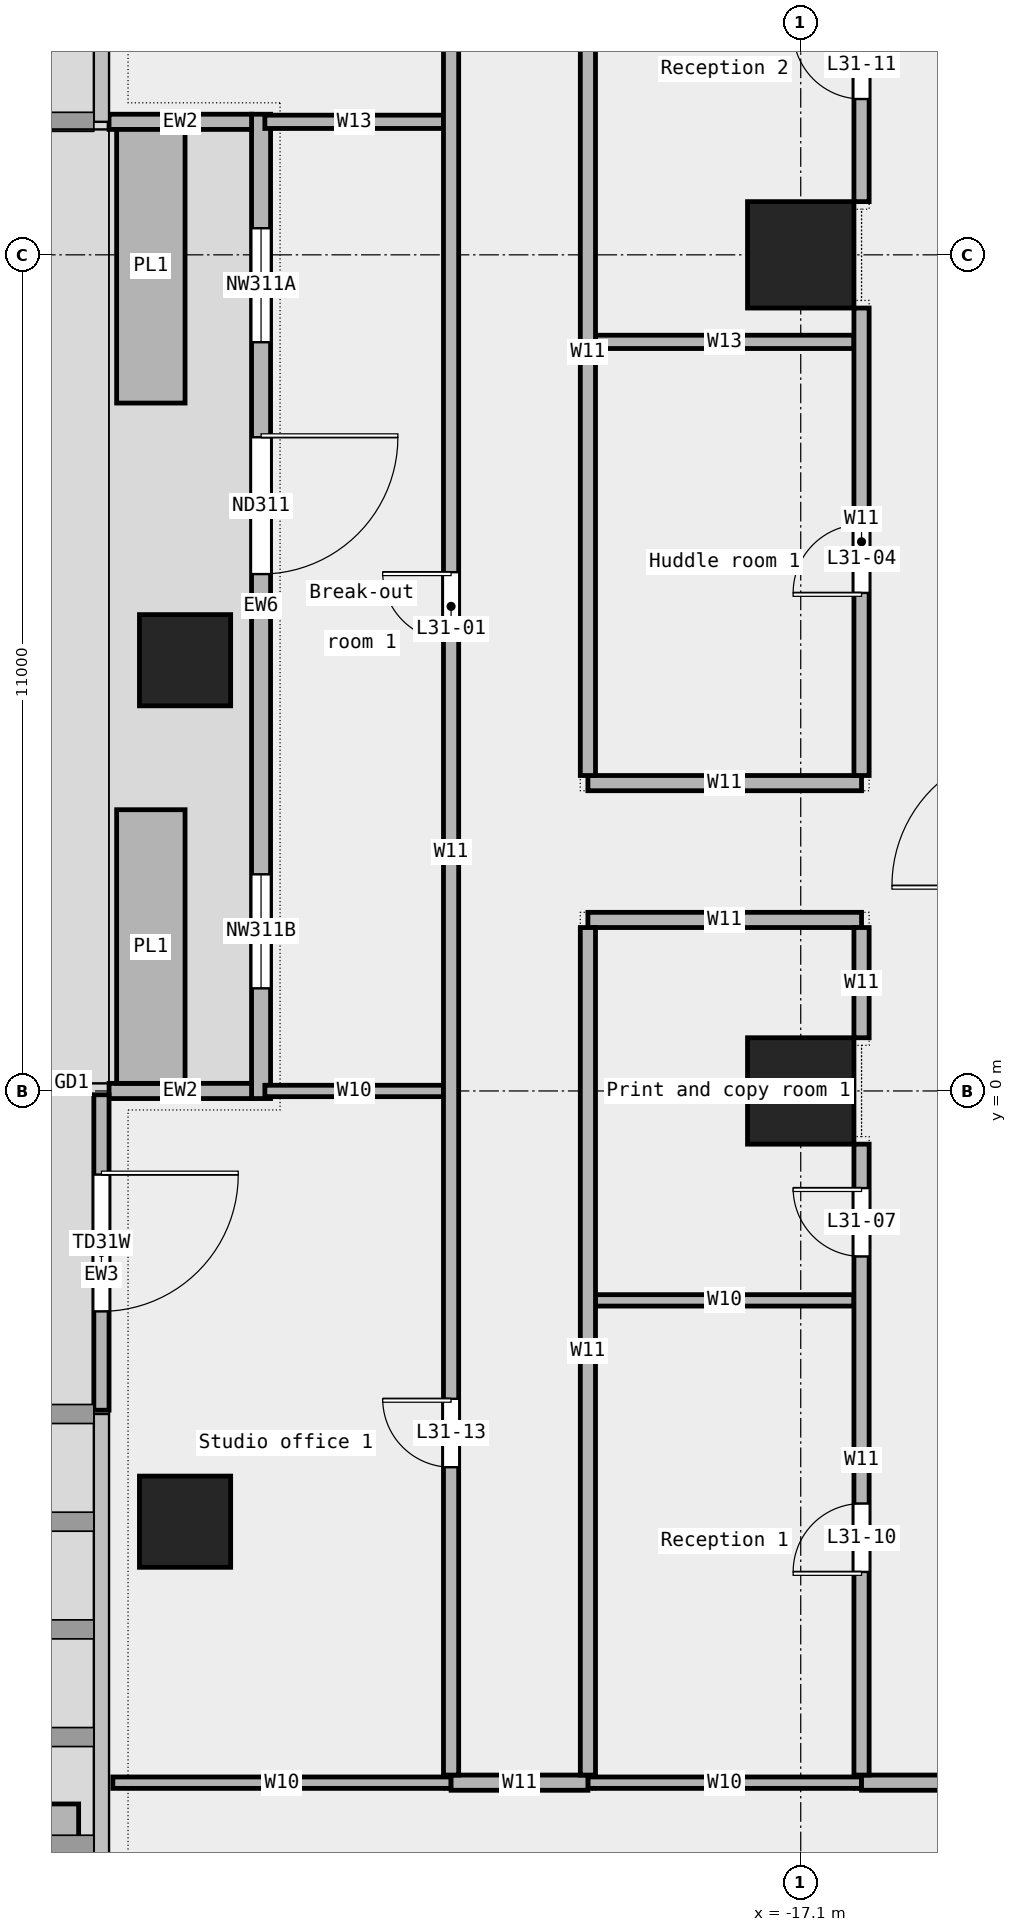
"""IFC4 building model, lengths in metres.
Left out: names, types, materials, properties, quantities, classifications, styles, units other than length and angle.
Written with IfcOpenShell. Run it as: python <this file> out.ifc"""

import sys

from ifc_helpers import new_model, si_unit, direction, frame, frame_2d, origin, origin_2d, place, context, subcontext, project, spatial, rectangle, extrude, element, fill, save


model = new_model("IFC4")
c1 = context("Model", 3, precision=1e-05, world=origin(), true_north=direction((0.0, 1.0)))
c2 = subcontext(c1, "Body", "Model", "MODEL_VIEW")
j1 = project(units=[si_unit("LENGTHUNIT", "METRE"), si_unit("PLANEANGLEUNIT", "RADIAN")], contexts=[c1])
p1 = place(None, origin())
s1 = spatial("IfcSite", under=j1, at=p1, CompositionType="ELEMENT")
p2 = place(p1, origin())
s2 = spatial("IfcBuilding", under=s1, at=p2, CompositionType="ELEMENT")
p3 = place(p2, frame((0.0, 0.0, 157.0)))
s3 = spatial("IfcBuildingStorey", under=s2, at=p3, CompositionType="ELEMENT", Elevation=157.0)
for number, where, z_axis, x_axis in (
    (1, (-25.2, 5.667, 0.0), (0.0, 0.0, 1.0), (1.0, 0.0, 0.0)),
    (2, (-25.2, -5.667, 0.0), (0.0, 0.0, 1.0), (1.0, 0.0, 0.0)),
):
    element("IfcColumn", number, at=place(p3, frame(where, z_axis=z_axis, x_axis=x_axis)), inside=s3, PredefinedType="COLUMN", context=c2, shape_type="SweptSolid", body=[
        extrude(rectangle(XDim=1.2, YDim=1.2, at=origin_2d()), origin(), (0.0, 0.0, 1.0), 3.6),
    ])
for number, where, z_axis, x_axis in (
    (3, (-17.1, 0.0, 0.0), (0.0, 0.0, 1.0), (1.0, 0.0, 0.0)),
    (4, (-17.1, 11.0, 0.0), (0.0, 0.0, 1.0), (1.0, 0.0, 0.0)),
):
    element("IfcColumn", number, at=place(p3, frame(where, z_axis=z_axis, x_axis=x_axis)), inside=s3, PredefinedType="COLUMN", context=c2, shape_type="SweptSolid", body=[
        extrude(rectangle(XDim=1.4, YDim=1.4, at=origin_2d()), origin(), (0.0, 0.0, 1.0), 3.6),
    ])
p4 = place(p3, frame((-24.2, 12.85, 0.0), z_axis=(0.0, 0.0, 1.0), x_axis=(0.0, -1.0, 0.0)))
e5 = element("IfcWall", 5, at=p4, inside=s3, PredefinedType="STANDARD", context=c2, shape_type="SweptSolid", body=[
    extrude(rectangle(XDim=12.95, YDim=0.25, at=frame_2d((6.475, 0.0))), origin(), (0.0, 0.0, 1.0), 3.6),
])
p5 = place(p4, frame((1.5, 0.0, 0.45)))
e6 = element("IfcOpeningElement", 6, at=p5, cuts=e5, PredefinedType="OPENING", context=c2, shape_type="SweptSolid", body=[
    extrude(rectangle(XDim=1.5, YDim=2.4, at=frame_2d((0.75, 1.2))), frame((0.0, 0.137, 0.0), z_axis=(0.0, -1.0, 0.0), x_axis=(1.0, 0.0, 0.0)), (0.0, 0.0, 1.0), 0.274),
])
p6 = place(p4, frame((4.25, 0.0, 0.0)))
e7 = element("IfcOpeningElement", 7, at=p6, cuts=e5, PredefinedType="OPENING", context=c2, shape_type="SweptSolid", body=[
    extrude(rectangle(XDim=1.8, YDim=2.4, at=frame_2d((0.9, 1.2))), frame((0.0, 0.137, 0.0), z_axis=(0.0, -1.0, 0.0), x_axis=(1.0, 0.0, 0.0)), (0.0, 0.0, 1.0), 0.274),
])
p7 = place(p4, frame((10.0, 0.0, 0.45)))
e8 = element("IfcOpeningElement", 8, at=p7, cuts=e5, PredefinedType="OPENING", context=c2, shape_type="SweptSolid", body=[
    extrude(rectangle(XDim=1.5, YDim=2.4, at=frame_2d((0.75, 1.2))), frame((0.0, 0.137, 0.0), z_axis=(0.0, -1.0, 0.0), x_axis=(1.0, 0.0, 0.0)), (0.0, 0.0, 1.0), 0.274),
])
for number, where, z_axis, x_axis in (
    (9, (-26.2, 12.75, 0.0), (0.0, 0.0, 1.0), (1.0, 0.0, 0.0)),
    (10, (-26.2, 0.0, 0.0), (0.0, 0.0, 1.0), (1.0, 0.0, 0.0)),
):
    element("IfcWall", number, at=place(p3, frame(where, z_axis=z_axis, x_axis=x_axis)), inside=s3, PredefinedType="STANDARD", context=c2, shape_type="SweptSolid", body=[
        extrude(rectangle(XDim=1.875, YDim=0.2, at=frame_2d((0.938, 0.0))), origin(), (0.0, 0.0, 1.0), 3.6),
    ])
for number, where, z_axis, x_axis in (
    (11, (-25.65, 12.65, 0.0), (0.0, 0.0, 1.0), (0.0, -1.0, 0.0)),
    (12, (-25.65, 3.7, 0.0), (0.0, 0.0, 1.0), (0.0, -1.0, 0.0)),
):
    element("IfcWall", number, at=place(p3, frame(where, z_axis=z_axis, x_axis=x_axis)), inside=s3, PredefinedType="STANDARD", context=c2, shape_type="SweptSolid", body=[
        extrude(rectangle(XDim=3.6, YDim=0.9, at=frame_2d((1.8, 0.0))), origin(), (0.0, 0.0, 1.0), 0.7),
    ])
p8 = place(p3, frame((-26.3, -0.05, 0.0), z_axis=(0.0, 0.0, 1.0), x_axis=(0.0, -1.0, 0.0)))
e13 = element("IfcWall", 13, at=p8, inside=s3, PredefinedType="STANDARD", context=c2, shape_type="SweptSolid", body=[
    extrude(rectangle(XDim=4.15, YDim=0.2, at=frame_2d((2.075, 0.0))), origin(), (0.0, 0.0, 1.0), 3.6),
])
p9 = place(p8, frame((1.05, 0.0, 0.0)))
e14 = element("IfcOpeningElement", 14, at=p9, cuts=e13, PredefinedType="OPENING", context=c2, shape_type="SweptSolid", body=[
    extrude(rectangle(XDim=1.8, YDim=2.4, at=frame_2d((0.9, 1.2))), frame((0.0, 0.112, 0.0), z_axis=(0.0, -1.0, 0.0), x_axis=(1.0, 0.0, 0.0)), (0.0, 0.0, 1.0), 0.224),
])
p10 = place(p3, frame((-26.9, -9.38, 0.0), z_axis=(0.0, 0.0, 1.0), x_axis=(0.0, -1.0, 0.0)))
e15 = element("IfcWall", 15, at=p10, inside=s3, PredefinedType="STANDARD", context=c2, shape_type="SweptSolid", body=[
    extrude(rectangle(XDim=3.0, YDim=0.6, at=frame_2d((1.5, 0.0))), origin(), (0.0, 0.0, 1.0), 0.7),
])
p11 = place(p3, frame((-26.15, -9.1, 0.0), z_axis=(0.0, 0.0, 1.0), x_axis=(1.0, 0.0, 0.0)))
e16 = element("IfcWall", 16, at=p11, inside=s3, PredefinedType="PARTITIONING", context=c2, shape_type="SweptSolid", body=[
    extrude(rectangle(XDim=4.45, YDim=0.15, at=frame_2d((2.225, 0.0))), origin(), (0.0, 0.0, 1.0), 3.6),
])
p12 = place(p3, frame((-19.9, -9.1, 0.0), z_axis=(0.0, 0.0, 1.0), x_axis=(1.0, 0.0, 0.0)))
e17 = element("IfcWall", 17, at=p12, inside=s3, PredefinedType="PARTITIONING", context=c2, shape_type="SweptSolid", body=[
    extrude(rectangle(XDim=3.6, YDim=0.15, at=frame_2d((1.8, 0.0))), origin(), (0.0, 0.0, 1.0), 3.6),
])
p13 = place(p3, frame((-21.7, -9.1, 0.0), z_axis=(0.0, 0.0, 1.0), x_axis=(1.0, 0.0, 0.0)))
e18 = element("IfcWall", 18, at=p13, inside=s3, PredefinedType="PARTITIONING", context=c2, shape_type="SweptSolid", body=[
    extrude(rectangle(XDim=1.8, YDim=0.2, at=frame_2d((0.9, 0.0))), origin(), (0.0, 0.0, 1.0), 3.6),
])
p14 = place(p3, frame((-16.3, -9.1, 0.0), z_axis=(0.0, 0.0, 1.0), x_axis=(1.0, 0.0, 0.0)))
e19 = element("IfcWall", 19, at=p14, inside=s3, PredefinedType="PARTITIONING", context=c2, shape_type="SweptSolid", body=[
    extrude(rectangle(XDim=5.02, YDim=0.2, at=frame_2d((2.51, 0.0))), origin(), (0.0, 0.0, 1.0), 3.6),
])
p15 = place(p3, frame((-19.8, -2.755, 0.0), z_axis=(0.0, 0.0, 1.0), x_axis=(1.0, 0.0, 0.0)))
e20 = element("IfcWall", 20, at=p15, inside=s3, PredefinedType="PARTITIONING", context=c2, shape_type="SweptSolid", body=[
    extrude(rectangle(XDim=3.4, YDim=0.15, at=frame_2d((1.7, 0.0))), origin(), (0.0, 0.0, 1.0), 3.6),
])
p16 = place(p3, frame((-24.15, 0.0, 0.0), z_axis=(0.0, 0.0, 1.0), x_axis=(1.0, 0.0, 0.0)))
e21 = element("IfcWall", 21, at=p16, inside=s3, PredefinedType="PARTITIONING", context=c2, shape_type="SweptSolid", body=[
    extrude(rectangle(XDim=2.35, YDim=0.15, at=frame_2d((1.175, 0.0))), origin(), (0.0, 0.0, 1.0), 3.6),
])
for number, where, z_axis, x_axis in (
    (22, (-19.9, 2.25, 0.0), (0.0, 0.0, 1.0), (1.0, 0.0, 0.0)),
    (23, (-19.9, 4.05, 0.0), (0.0, 0.0, 1.0), (1.0, 0.0, 0.0)),
):
    element("IfcWall", number, at=place(p3, frame(where, z_axis=z_axis, x_axis=x_axis)), inside=s3, PredefinedType="PARTITIONING", context=c2, shape_type="SweptSolid", body=[
        extrude(rectangle(XDim=3.6, YDim=0.2, at=frame_2d((1.8, 0.0))), origin(), (0.0, 0.0, 1.0), 3.6),
    ])
p17 = place(p3, frame((-19.8, 9.855, 0.0), z_axis=(0.0, 0.0, 1.0), x_axis=(1.0, 0.0, 0.0)))
e24 = element("IfcWall", 24, at=p17, inside=s3, PredefinedType="PARTITIONING", context=c2, shape_type="SweptSolid", body=[
    extrude(rectangle(XDim=3.4, YDim=0.175, at=frame_2d((1.7, 0.0))), origin(), (0.0, 0.0, 1.0), 3.6),
])
p18 = place(p3, frame((-24.15, 12.75, 0.0), z_axis=(0.0, 0.0, 1.0), x_axis=(1.0, 0.0, 0.0)))
e25 = element("IfcWall", 25, at=p18, inside=s3, PredefinedType="PARTITIONING", context=c2, shape_type="SweptSolid", body=[
    extrude(rectangle(XDim=2.35, YDim=0.175, at=frame_2d((1.175, 0.0))), origin(), (0.0, 0.0, 1.0), 3.6),
])
p19 = place(p3, frame((-21.7, -9.0, 0.0), z_axis=(0.0, 0.0, 1.0), x_axis=(0.0, 1.0, 0.0)))
e26 = element("IfcWall", 26, at=p19, inside=s3, PredefinedType="PARTITIONING", context=c2, shape_type="SweptSolid", body=[
    extrude(rectangle(XDim=24.3, YDim=0.2, at=frame_2d((12.15, 0.0))), origin(), (0.0, 0.0, 1.0), 3.6),
])
p20 = place(p19, frame((14.925, 0.0, 0.0)))
e27 = element("IfcOpeningElement", 27, at=p20, cuts=e26, PredefinedType="OPENING", context=c2, shape_type="SweptSolid", body=[
    extrude(rectangle(XDim=0.9, YDim=2.1, at=frame_2d((0.45, 1.05))), frame((0.0, 0.112, 0.0), z_axis=(0.0, -1.0, 0.0), x_axis=(1.0, 0.0, 0.0)), (0.0, 0.0, 1.0), 0.224),
])
p21 = place(p19, frame((4.05, 0.0, 0.0)))
e28 = element("IfcOpeningElement", 28, at=p21, cuts=e26, PredefinedType="OPENING", context=c2, shape_type="SweptSolid", body=[
    extrude(rectangle(XDim=0.9, YDim=2.1, at=frame_2d((0.45, 1.05))), frame((0.0, 0.112, 0.0), z_axis=(0.0, -1.0, 0.0), x_axis=(1.0, 0.0, 0.0)), (0.0, 0.0, 1.0), 0.224),
])
p22 = place(p3, frame((-19.9, -9.0, 0.0), z_axis=(0.0, 0.0, 1.0), x_axis=(0.0, 1.0, 0.0)))
e29 = element("IfcWall", 29, at=p22, inside=s3, PredefinedType="PARTITIONING", context=c2, shape_type="SweptSolid", body=[
    extrude(rectangle(XDim=11.15, YDim=0.2, at=frame_2d((5.575, 0.0))), origin(), (0.0, 0.0, 1.0), 3.6),
])
p23 = place(p3, frame((-19.9, 4.15, 0.0), z_axis=(0.0, 0.0, 1.0), x_axis=(0.0, 1.0, 0.0)))
e30 = element("IfcWall", 30, at=p23, inside=s3, PredefinedType="PARTITIONING", context=c2, shape_type="SweptSolid", body=[
    extrude(rectangle(XDim=11.15, YDim=0.2, at=frame_2d((5.575, 0.0))), origin(), (0.0, 0.0, 1.0), 3.6),
])
p24 = place(p3, frame((-16.3, -9.0, 0.0), z_axis=(0.0, 0.0, 1.0), x_axis=(0.0, 1.0, 0.0)))
e31 = element("IfcWall", 31, at=p24, inside=s3, PredefinedType="PARTITIONING", context=c2, shape_type="SweptSolid", body=[
    extrude(rectangle(XDim=8.3, YDim=0.2, at=frame_2d((4.15, 0.0))), origin(), (0.0, 0.0, 1.0), 3.6),
])
p25 = place(p24, frame((6.823, 0.0, 0.0)))
e32 = element("IfcOpeningElement", 32, at=p25, cuts=e31, PredefinedType="OPENING", context=c2, shape_type="SweptSolid", body=[
    extrude(rectangle(XDim=0.9, YDim=2.1, at=frame_2d((0.45, 1.05))), frame((0.0, 0.112, 0.0), z_axis=(0.0, -1.0, 0.0), x_axis=(1.0, 0.0, 0.0)), (0.0, 0.0, 1.0), 0.224),
])
p26 = place(p24, frame((2.673, 0.0, 0.0)))
e33 = element("IfcOpeningElement", 33, at=p26, cuts=e31, PredefinedType="OPENING", context=c2, shape_type="SweptSolid", body=[
    extrude(rectangle(XDim=0.9, YDim=2.1, at=frame_2d((0.45, 1.05))), frame((0.0, 0.112, 0.0), z_axis=(0.0, -1.0, 0.0), x_axis=(1.0, 0.0, 0.0)), (0.0, 0.0, 1.0), 0.224),
])
p27 = place(p3, frame((-16.3, 0.7, 0.0), z_axis=(0.0, 0.0, 1.0), x_axis=(0.0, 1.0, 0.0)))
e34 = element("IfcWall", 34, at=p27, inside=s3, PredefinedType="PARTITIONING", context=c2, shape_type="SweptSolid", body=[
    extrude(rectangle(XDim=1.45, YDim=0.2, at=frame_2d((0.725, 0.0))), origin(), (0.0, 0.0, 1.0), 3.6),
])
p28 = place(p3, frame((-16.3, 4.15, 0.0), z_axis=(0.0, 0.0, 1.0), x_axis=(0.0, 1.0, 0.0)))
e35 = element("IfcWall", 35, at=p28, inside=s3, PredefinedType="PARTITIONING", context=c2, shape_type="SweptSolid", body=[
    extrude(rectangle(XDim=6.15, YDim=0.2, at=frame_2d((3.075, 0.0))), origin(), (0.0, 0.0, 1.0), 3.6),
])
p29 = place(p28, frame((2.403, 0.0, 0.0)))
e36 = element("IfcOpeningElement", 36, at=p29, cuts=e35, PredefinedType="OPENING", context=c2, shape_type="SweptSolid", body=[
    extrude(rectangle(XDim=0.9, YDim=2.1, at=frame_2d((0.45, 1.05))), frame((0.0, 0.112, 0.0), z_axis=(0.0, -1.0, 0.0), x_axis=(1.0, 0.0, 0.0)), (0.0, 0.0, 1.0), 0.224),
])
p30 = place(p3, frame((-16.3, 11.7, 0.0), z_axis=(0.0, 0.0, 1.0), x_axis=(0.0, 1.0, 0.0)))
e37 = element("IfcWall", 37, at=p30, inside=s3, PredefinedType="PARTITIONING", context=c2, shape_type="SweptSolid", body=[
    extrude(rectangle(XDim=3.6, YDim=0.2, at=frame_2d((1.8, 0.0))), origin(), (0.0, 0.0, 1.0), 3.6),
])
p31 = place(p30, frame((1.35, 0.0, 0.0)))
e38 = element("IfcOpeningElement", 38, at=p31, cuts=e37, PredefinedType="OPENING", context=c2, shape_type="SweptSolid", body=[
    extrude(rectangle(XDim=0.9, YDim=2.1, at=frame_2d((0.45, 1.05))), frame((0.0, 0.112, 0.0), z_axis=(0.0, -1.0, 0.0), x_axis=(1.0, 0.0, 0.0)), (0.0, 0.0, 1.0), 0.224),
])
p32 = place(p5, origin())
e39 = element("IfcWindow", 39, at=p32, inside=s3, PartitioningType="SINGLE_PANEL", PredefinedType="WINDOW", context=c2, shape_type="SweptSolid", body=[
    extrude(rectangle(XDim=1.5, YDim=2.4, at=frame_2d((0.75, 1.2))), frame((0.0, 0.03, 0.0), z_axis=(0.0, -1.0, 0.0), x_axis=(1.0, 0.0, 0.0)), (0.0, 0.0, 1.0), 0.06),
])
fill(e6, e39)
p33 = place(p6, origin())
e40 = element("IfcDoor", 40, at=p33, inside=s3, OperationType="DOUBLE_DOOR_SINGLE_SWING", PredefinedType="DOOR", context=c2, shape_type="SweptSolid", body=[
    extrude(rectangle(XDim=1.8, YDim=2.4, at=frame_2d((0.9, 1.2))), frame((0.0, 0.025, 0.0), z_axis=(0.0, -1.0, 0.0), x_axis=(1.0, 0.0, 0.0)), (0.0, 0.0, 1.0), 0.05),
])
fill(e7, e40)
p34 = place(p7, origin())
e41 = element("IfcWindow", 41, at=p34, inside=s3, PartitioningType="SINGLE_PANEL", PredefinedType="WINDOW", context=c2, shape_type="SweptSolid", body=[
    extrude(rectangle(XDim=1.5, YDim=2.4, at=frame_2d((0.75, 1.2))), frame((0.0, 0.03, 0.0), z_axis=(0.0, -1.0, 0.0), x_axis=(1.0, 0.0, 0.0)), (0.0, 0.0, 1.0), 0.06),
])
fill(e8, e41)
p35 = place(p9, origin())
e42 = element("IfcDoor", 42, at=p35, inside=s3, OperationType="DOUBLE_DOOR_SINGLE_SWING", PredefinedType="DOOR", context=c2, shape_type="SweptSolid", body=[
    extrude(rectangle(XDim=1.8, YDim=2.4, at=frame_2d((0.9, 1.2))), frame((0.0, 0.025, 0.0), z_axis=(0.0, -1.0, 0.0), x_axis=(1.0, 0.0, 0.0)), (0.0, 0.0, 1.0), 0.05),
])
fill(e14, e42)
p36 = place(p20, origin())
e43 = element("IfcDoor", 43, at=p36, inside=s3, OperationType="SINGLE_SWING_RIGHT", PredefinedType="DOOR", context=c2, shape_type="SweptSolid", body=[
    extrude(rectangle(XDim=0.9, YDim=2.1, at=frame_2d((0.45, 1.05))), frame((0.0, 0.025, 0.0), z_axis=(0.0, -1.0, 0.0), x_axis=(1.0, 0.0, 0.0)), (0.0, 0.0, 1.0), 0.05),
])
fill(e27, e43)
p37 = place(p29, origin())
e44 = element("IfcDoor", 44, at=p37, inside=s3, OperationType="SINGLE_SWING_LEFT", PredefinedType="DOOR", context=c2, shape_type="SweptSolid", body=[
    extrude(rectangle(XDim=0.9, YDim=2.1, at=frame_2d((0.45, 1.05))), frame((0.0, 0.025, 0.0), z_axis=(0.0, -1.0, 0.0), x_axis=(1.0, 0.0, 0.0)), (0.0, 0.0, 1.0), 0.05),
])
fill(e36, e44)
p38 = place(p25, origin())
e45 = element("IfcDoor", 45, at=p38, inside=s3, OperationType="SINGLE_SWING_RIGHT", PredefinedType="DOOR", context=c2, shape_type="SweptSolid", body=[
    extrude(rectangle(XDim=0.9, YDim=2.1, at=frame_2d((0.45, 1.05))), frame((0.0, 0.025, 0.0), z_axis=(0.0, -1.0, 0.0), x_axis=(1.0, 0.0, 0.0)), (0.0, 0.0, 1.0), 0.05),
])
fill(e32, e45)
p39 = place(p26, origin())
e46 = element("IfcDoor", 46, at=p39, inside=s3, OperationType="SINGLE_SWING_LEFT", PredefinedType="DOOR", context=c2, shape_type="SweptSolid", body=[
    extrude(rectangle(XDim=0.9, YDim=2.1, at=frame_2d((0.45, 1.05))), frame((0.0, 0.025, 0.0), z_axis=(0.0, -1.0, 0.0), x_axis=(1.0, 0.0, 0.0)), (0.0, 0.0, 1.0), 0.05),
])
fill(e33, e46)
p40 = place(p31, origin())
e47 = element("IfcDoor", 47, at=p40, inside=s3, OperationType="SINGLE_SWING_RIGHT", PredefinedType="DOOR", context=c2, shape_type="SweptSolid", body=[
    extrude(rectangle(XDim=0.9, YDim=2.1, at=frame_2d((0.45, 1.05))), frame((0.0, 0.025, 0.0), z_axis=(0.0, -1.0, 0.0), x_axis=(1.0, 0.0, 0.0)), (0.0, 0.0, 1.0), 0.05),
])
fill(e38, e47)
p41 = place(p21, origin())
e48 = element("IfcDoor", 48, at=p41, inside=s3, OperationType="SINGLE_SWING_RIGHT", PredefinedType="DOOR", context=c2, shape_type="SweptSolid", body=[
    extrude(rectangle(XDim=0.9, YDim=2.1, at=frame_2d((0.45, 1.05))), frame((0.0, 0.025, 0.0), z_axis=(0.0, -1.0, 0.0), x_axis=(1.0, 0.0, 0.0)), (0.0, 0.0, 1.0), 0.05),
])
fill(e28, e48)
save(model, sys.argv[1])
